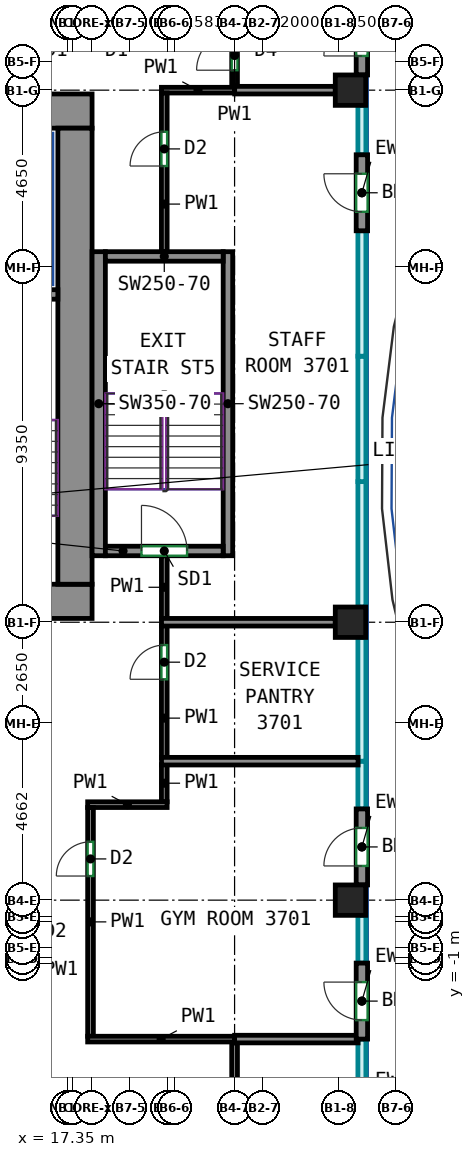
"""IFC4 building model, lengths in metres.
Left out: names, types, materials, properties, quantities, classifications, styles, units other than length and angle.
Written with IfcOpenShell. Run it as: python <this file> out.ifc"""

import sys

from ifc_helpers import new_model, si_unit, direction, frame, frame_2d, origin, origin_2d, place, context, subcontext, project, spatial, rectangle, extrude, source, transform, mapped, element, fill, save


model = new_model("IFC4")
c1 = context("Model", 3, precision=1e-05, world=origin(), true_north=direction((0.0, 1.0)))
c2 = subcontext(c1, "Body", "Model", "MODEL_VIEW")
j1 = project(units=[si_unit("LENGTHUNIT", "METRE"), si_unit("PLANEANGLEUNIT", "RADIAN")], contexts=[c1])
p1 = place(None, origin())
s1 = spatial("IfcSite", under=j1, at=p1, CompositionType="ELEMENT")
p2 = place(p1, origin())
s2 = spatial("IfcBuilding", under=s1, at=p2, CompositionType="ELEMENT")
p3 = place(p2, frame((0.0, 0.0, 160.9)))
s3 = spatial("IfcBuildingStorey", under=s2, at=p3, CompositionType="ELEMENT", Elevation=160.9)
m1 = source(origin(), c2, "Body", "SweptSolid", [
    extrude(rectangle(XDim=0.8, YDim=0.8, at=origin_2d()), origin(), (0.0, 0.0, 1.0), 3.0),
])
for number, where, z_axis, x_axis in (
    (1, (24.8, 0.688, 0.0), (0.0, 0.0, 1.0), (1.0, 0.0, 0.0)),
    (2, (24.8, 8.0, 0.0), (0.0, 0.0, 1.0), (1.0, 0.0, 0.0)),
    (3, (24.8, 22.0, 0.0), (0.0, 0.0, 1.0), (1.0, 0.0, 0.0)),
):
    element("IfcColumn", number, at=place(p3, frame(where, z_axis=z_axis, x_axis=x_axis)), inside=s3, PredefinedType="COLUMN", context=c2, shape_type="MappedRepresentation", body=[
        mapped(m1, transform((0.0, 0.0, 0.0))),
    ])
m2 = source(origin(), c2, "Body", "SweptSolid", [
    extrude(rectangle(XDim=5.53, YDim=0.9, at=frame_2d((2.765, 0.0))), origin(), (0.0, 0.0, 1.0), 3.0),
])
p4 = place(p3, frame((12.47, 8.55, 0.0), z_axis=(0.0, 0.0, 1.0), x_axis=(1.0, 0.0, 0.0)))
e4 = element("IfcWall", 4, at=p4, inside=s3, PredefinedType="SHEAR", context=c2, shape_type="MappedRepresentation", body=[
    mapped(m2, transform((0.0, 0.0, 0.0))),
])
p5 = place(p4, frame((2.18, 0.0, 0.0)))
e5 = element("IfcOpeningElement", 5, at=p5, cuts=e4, PredefinedType="OPENING", context=c2, shape_type="SweptSolid", body=[
    extrude(rectangle(XDim=1.2, YDim=2.1, at=frame_2d((0.6, 1.05))), frame((0.0, 0.46, 0.0), z_axis=(0.0, -1.0, 0.0), x_axis=(1.0, 0.0, 0.0)), (0.0, 0.0, 1.0), 0.92),
])
m3 = source(origin(), c2, "Body", "SweptSolid", [
    extrude(rectangle(XDim=33.9, YDim=0.9, at=frame_2d((16.95, 0.0))), origin(), (0.0, 0.0, 1.0), 3.0),
])
p6 = place(p3, frame((-15.9, 21.45, 0.0), z_axis=(0.0, 0.0, 1.0), x_axis=(1.0, 0.0, 0.0)))
e6 = element("IfcWall", 6, at=p6, inside=s3, PredefinedType="SHEAR", context=c2, shape_type="MappedRepresentation", body=[
    mapped(m3, transform((0.0, 0.0, 0.0))),
])
p7 = place(p6, frame((6.731, 0.0, 0.0)))
e7 = element("IfcOpeningElement", 7, at=p7, cuts=e6, PredefinedType="OPENING", context=c2, shape_type="SweptSolid", body=[
    extrude(rectangle(XDim=0.9, YDim=2.1, at=frame_2d((0.45, 1.05))), frame((0.0, 0.46, 0.0), z_axis=(0.0, -1.0, 0.0), x_axis=(1.0, 0.0, 0.0)), (0.0, 0.0, 1.0), 0.92),
])
p8 = place(p6, frame((12.038, 0.0, 0.0)))
e8 = element("IfcOpeningElement", 8, at=p8, cuts=e6, PredefinedType="OPENING", context=c2, shape_type="SweptSolid", body=[
    extrude(rectangle(XDim=0.9, YDim=2.1, at=frame_2d((0.45, 1.05))), frame((0.0, 0.46, 0.0), z_axis=(0.0, -1.0, 0.0), x_axis=(1.0, 0.0, 0.0)), (0.0, 0.0, 1.0), 0.92),
])
p9 = place(p6, frame((16.446, 0.0, 0.0)))
e9 = element("IfcOpeningElement", 9, at=p9, cuts=e6, PredefinedType="OPENING", context=c2, shape_type="SweptSolid", body=[
    extrude(rectangle(XDim=0.9, YDim=2.1, at=frame_2d((0.45, 1.05))), frame((0.0, 0.46, 0.0), z_axis=(0.0, -1.0, 0.0), x_axis=(1.0, 0.0, 0.0)), (0.0, 0.0, 1.0), 0.92),
])
p10 = place(p6, frame((18.858, 0.0, 0.0)))
e10 = element("IfcOpeningElement", 10, at=p10, cuts=e6, PredefinedType="OPENING", context=c2, shape_type="SweptSolid", body=[
    extrude(rectangle(XDim=0.9, YDim=2.1, at=frame_2d((0.45, 1.05))), frame((0.0, 0.46, 0.0), z_axis=(0.0, -1.0, 0.0), x_axis=(1.0, 0.0, 0.0)), (0.0, 0.0, 1.0), 0.92),
])
p11 = place(p6, frame((21.686, 0.0, 0.0)))
e11 = element("IfcOpeningElement", 11, at=p11, cuts=e6, PredefinedType="OPENING", context=c2, shape_type="SweptSolid", body=[
    extrude(rectangle(XDim=0.9, YDim=2.1, at=frame_2d((0.45, 1.05))), frame((0.0, 0.46, 0.0), z_axis=(0.0, -1.0, 0.0), x_axis=(1.0, 0.0, 0.0)), (0.0, 0.0, 1.0), 0.92),
])
p12 = place(p6, frame((26.027, 0.0, 0.0)))
e12 = element("IfcOpeningElement", 12, at=p12, cuts=e6, PredefinedType="OPENING", context=c2, shape_type="SweptSolid", body=[
    extrude(rectangle(XDim=0.9, YDim=2.1, at=frame_2d((0.45, 1.05))), frame((0.0, 0.46, 0.0), z_axis=(0.0, -1.0, 0.0), x_axis=(1.0, 0.0, 0.0)), (0.0, 0.0, 1.0), 0.92),
])
p13 = place(p6, frame((2.425, 0.0, 0.0)))
e13 = element("IfcOpeningElement", 13, at=p13, cuts=e6, PredefinedType="OPENING", context=c2, shape_type="SweptSolid", body=[
    extrude(rectangle(XDim=0.9, YDim=2.1, at=frame_2d((0.45, 1.05))), frame((0.0, 0.46, 0.0), z_axis=(0.0, -1.0, 0.0), x_axis=(1.0, 0.0, 0.0)), (0.0, 0.0, 1.0), 0.92),
])
p14 = place(p6, frame((30.575, 0.0, 0.0)))
e14 = element("IfcOpeningElement", 14, at=p14, cuts=e6, PredefinedType="OPENING", context=c2, shape_type="SweptSolid", body=[
    extrude(rectangle(XDim=0.9, YDim=2.1, at=frame_2d((0.45, 1.05))), frame((0.0, 0.46, 0.0), z_axis=(0.0, -1.0, 0.0), x_axis=(1.0, 0.0, 0.0)), (0.0, 0.0, 1.0), 0.92),
])
m4 = source(origin(), c2, "Body", "SweptSolid", [
    extrude(rectangle(XDim=12.0, YDim=0.9, at=frame_2d((6.0, 0.0))), origin(), (0.0, 0.0, 1.0), 3.0),
])
p15 = place(p3, frame((17.55, 9.0, 0.0), z_axis=(0.0, 0.0, 1.0), x_axis=(0.0, 1.0, 0.0)))
e15 = element("IfcWall", 15, at=p15, inside=s3, PredefinedType="SHEAR", context=c2, shape_type="MappedRepresentation", body=[
    mapped(m4, transform((0.0, 0.0, 0.0))),
])
m5 = source(origin(), c2, "Body", "SweptSolid", [
    extrude(rectangle(XDim=3.7, YDim=0.25, at=frame_2d((1.85, 0.0))), origin(), (0.0, 0.0, 1.0), 3.0),
])
p16 = place(p3, frame((13.4, 16.625, 0.0), z_axis=(0.0, 0.0, 1.0), x_axis=(1.0, 0.0, 0.0)))
e16 = element("IfcWall", 16, at=p16, inside=s3, PredefinedType="SHEAR", context=c2, shape_type="MappedRepresentation", body=[
    mapped(m5, transform((0.0, 0.0, 0.0))),
])
m6 = source(origin(), c2, "Body", "SweptSolid", [
    extrude(rectangle(XDim=8.0, YDim=0.35, at=frame_2d((4.0, 0.0))), origin(), (0.0, 0.0, 1.0), 3.0),
])
p17 = place(p3, frame((18.175, 9.75, 0.0), z_axis=(0.0, 0.0, 1.0), x_axis=(0.0, 1.0, 0.0)))
e17 = element("IfcWall", 17, at=p17, inside=s3, PredefinedType="SHEAR", context=c2, shape_type="MappedRepresentation", body=[
    mapped(m6, transform((0.0, 0.0, 0.0))),
])
m7 = source(origin(), c2, "Body", "SweptSolid", [
    extrude(rectangle(XDim=8.0, YDim=0.25, at=frame_2d((4.0, 0.0))), origin(), (0.0, 0.0, 1.0), 3.0),
])
p18 = place(p3, frame((21.575, 9.75, 0.0), z_axis=(0.0, 0.0, 1.0), x_axis=(0.0, 1.0, 0.0)))
e18 = element("IfcWall", 18, at=p18, inside=s3, PredefinedType="SHEAR", context=c2, shape_type="MappedRepresentation", body=[
    mapped(m7, transform((0.0, 0.0, 0.0))),
])
m8 = source(origin(), c2, "Body", "SweptSolid", [
    extrude(rectangle(XDim=3.1, YDim=0.25, at=frame_2d((1.55, 0.0))), origin(), (0.0, 0.0, 1.0), 3.0),
])
p19 = place(p3, frame((18.35, 9.875, 0.0), z_axis=(0.0, 0.0, 1.0), x_axis=(1.0, 0.0, 0.0)))
e19 = element("IfcWall", 19, at=p19, inside=s3, PredefinedType="SHEAR", context=c2, shape_type="MappedRepresentation", body=[
    mapped(m8, transform((0.0, 0.0, 0.0))),
])
p20 = place(p19, frame((0.95, 0.0, 0.0)))
e20 = element("IfcOpeningElement", 20, at=p20, cuts=e19, PredefinedType="OPENING", context=c2, shape_type="SweptSolid", body=[
    extrude(rectangle(XDim=1.2, YDim=2.1, at=frame_2d((0.6, 1.05))), frame((0.0, 0.135, 0.0), z_axis=(0.0, -1.0, 0.0), x_axis=(1.0, 0.0, 0.0)), (0.0, 0.0, 1.0), 0.27),
])
p21 = place(p3, frame((18.35, 17.625, 0.0), z_axis=(0.0, 0.0, 1.0), x_axis=(1.0, 0.0, 0.0)))
e21 = element("IfcWall", 21, at=p21, inside=s3, PredefinedType="SHEAR", context=c2, shape_type="MappedRepresentation", body=[
    mapped(m8, transform((0.0, 0.0, 0.0))),
])
m9 = source(origin(), c2, "Body", "SweptSolid", [
    extrude(rectangle(XDim=2.0, YDim=0.3, at=frame_2d((1.0, 0.0))), origin(), (0.0, 0.0, 1.0), 3.0),
])
p22 = place(p3, frame((25.1, -2.969, 0.0), z_axis=(0.0, 0.0, 1.0), x_axis=(0.0, 1.0, 0.0)))
e22 = element("IfcWall", 22, at=p22, inside=s3, PredefinedType="SOLIDWALL", context=c2, shape_type="MappedRepresentation", body=[
    mapped(m9, transform((0.0, 0.0, 0.0))),
])
p23 = place(p22, frame((0.5, 0.0, 0.0)))
e23 = element("IfcOpeningElement", 23, at=p23, cuts=e22, PredefinedType="OPENING", context=c2, shape_type="SweptSolid", body=[
    extrude(rectangle(XDim=1.0, YDim=2.1, at=frame_2d((0.5, 1.05))), frame((0.0, 0.16, 0.0), z_axis=(0.0, -1.0, 0.0), x_axis=(1.0, 0.0, 0.0)), (0.0, 0.0, 1.0), 0.32),
])
p24 = place(p3, frame((25.1, 1.087, 0.0), z_axis=(0.0, 0.0, 1.0), x_axis=(0.0, 1.0, 0.0)))
e24 = element("IfcWall", 24, at=p24, inside=s3, PredefinedType="SOLIDWALL", context=c2, shape_type="MappedRepresentation", body=[
    mapped(m9, transform((0.0, 0.0, 0.0))),
])
p25 = place(p24, frame((0.5, 0.0, 0.0)))
e25 = element("IfcOpeningElement", 25, at=p25, cuts=e24, PredefinedType="OPENING", context=c2, shape_type="SweptSolid", body=[
    extrude(rectangle(XDim=1.0, YDim=2.1, at=frame_2d((0.5, 1.05))), frame((0.0, 0.16, 0.0), z_axis=(0.0, -1.0, 0.0), x_axis=(1.0, 0.0, 0.0)), (0.0, 0.0, 1.0), 0.32),
])
p26 = place(p3, frame((25.1, 18.3, 0.0), z_axis=(0.0, 0.0, 1.0), x_axis=(0.0, 1.0, 0.0)))
e26 = element("IfcWall", 26, at=p26, inside=s3, PredefinedType="SOLIDWALL", context=c2, shape_type="MappedRepresentation", body=[
    mapped(m9, transform((0.0, 0.0, 0.0))),
])
p27 = place(p26, frame((0.5, 0.0, 0.0)))
e27 = element("IfcOpeningElement", 27, at=p27, cuts=e26, PredefinedType="OPENING", context=c2, shape_type="SweptSolid", body=[
    extrude(rectangle(XDim=1.0, YDim=2.1, at=frame_2d((0.5, 1.05))), frame((0.0, 0.16, 0.0), z_axis=(0.0, -1.0, 0.0), x_axis=(1.0, 0.0, 0.0)), (0.0, 0.0, 1.0), 0.32),
])
p28 = place(p3, frame((25.1, 22.4, 0.0), z_axis=(0.0, 0.0, 1.0), x_axis=(0.0, 1.0, 0.0)))
e28 = element("IfcWall", 28, at=p28, inside=s3, PredefinedType="SOLIDWALL", context=c2, shape_type="MappedRepresentation", body=[
    mapped(m9, transform((0.0, 0.0, 0.0))),
])
p29 = place(p28, frame((0.5, 0.0, 0.0)))
e29 = element("IfcOpeningElement", 29, at=p29, cuts=e28, PredefinedType="OPENING", context=c2, shape_type="SweptSolid", body=[
    extrude(rectangle(XDim=1.0, YDim=2.1, at=frame_2d((0.5, 1.05))), frame((0.0, 0.16, 0.0), z_axis=(0.0, -1.0, 0.0), x_axis=(1.0, 0.0, 0.0)), (0.0, 0.0, 1.0), 0.32),
])
p30 = place(p3, frame((21.75, 22.1, 0.0), z_axis=(0.0, 0.0, 1.0), x_axis=(0.0, 1.0, 0.0)))
e30 = element("IfcWall", 30, at=p30, inside=s3, PredefinedType="PARTITIONING", context=c2, shape_type="SweptSolid", body=[
    extrude(rectangle(XDim=1.625, YDim=0.15, at=frame_2d((0.812, 0.0))), origin(), (0.0, 0.0, 1.0), 3.0),
])
p31 = place(p30, frame((0.425, 0.0, 0.0)))
e31 = element("IfcOpeningElement", 31, at=p31, cuts=e30, PredefinedType="OPENING", context=c2, shape_type="SweptSolid", body=[
    extrude(rectangle(XDim=1.0, YDim=2.1, at=frame_2d((0.5, 1.05))), frame((0.0, 0.085, 0.0), z_axis=(0.0, -1.0, 0.0), x_axis=(1.0, 0.0, 0.0)), (0.0, 0.0, 1.0), 0.17),
])
p32 = place(p3, frame((19.9, 4.434, 0.0), z_axis=(0.0, 0.0, 1.0), x_axis=(0.0, 1.0, 0.0)))
e32 = element("IfcWall", 32, at=p32, inside=s3, PredefinedType="PARTITIONING", context=c2, shape_type="SweptSolid", body=[
    extrude(rectangle(XDim=3.476, YDim=0.15, at=frame_2d((1.738, 0.0))), origin(), (0.0, 0.0, 1.0), 3.0),
])
p33 = place(p32, frame((2.065, 0.0, 0.0)))
e33 = element("IfcOpeningElement", 33, at=p33, cuts=e32, PredefinedType="OPENING", context=c2, shape_type="SweptSolid", body=[
    extrude(rectangle(XDim=0.9, YDim=2.1, at=frame_2d((0.45, 1.05))), frame((0.0, 0.085, 0.0), z_axis=(0.0, -1.0, 0.0), x_axis=(1.0, 0.0, 0.0)), (0.0, 0.0, 1.0), 0.17),
])
p34 = place(p3, frame((19.825, 22.0, 0.0), z_axis=(0.0, 0.0, 1.0), x_axis=(1.0, 0.0, 0.0)))
e34 = element("IfcWall", 34, at=p34, inside=s3, PredefinedType="PARTITIONING", context=c2, shape_type="SweptSolid", body=[
    extrude(rectangle(XDim=1.925, YDim=0.15, at=frame_2d((0.962, 0.0))), origin(), (0.0, 0.0, 1.0), 3.0),
])
p35 = place(p3, frame((19.9, 17.75, 0.0), z_axis=(0.0, 0.0, 1.0), x_axis=(0.0, 1.0, 0.0)))
e35 = element("IfcWall", 35, at=p35, inside=s3, PredefinedType="PARTITIONING", context=c2, shape_type="SweptSolid", body=[
    extrude(rectangle(XDim=4.175, YDim=0.15, at=frame_2d((2.087, 0.0))), origin(), (0.0, 0.0, 1.0), 3.0),
])
p36 = place(p35, frame((2.254, 0.0, 0.0)))
e36 = element("IfcOpeningElement", 36, at=p36, cuts=e35, PredefinedType="OPENING", context=c2, shape_type="SweptSolid", body=[
    extrude(rectangle(XDim=0.9, YDim=2.1, at=frame_2d((0.45, 1.05))), frame((0.0, 0.085, 0.0), z_axis=(0.0, -1.0, 0.0), x_axis=(1.0, 0.0, 0.0)), (0.0, 0.0, 1.0), 0.17),
])
p37 = place(p3, frame((19.9, 8.09, 0.0), z_axis=(0.0, 0.0, 1.0), x_axis=(0.0, 1.0, 0.0)))
e37 = element("IfcWall", 37, at=p37, inside=s3, PredefinedType="PARTITIONING", context=c2, shape_type="SweptSolid", body=[
    extrude(rectangle(XDim=1.66, YDim=0.15, at=frame_2d((0.83, 0.0))), origin(), (0.0, 0.0, 1.0), 3.0),
])
p38 = place(p3, frame((19.9, 3.275, 0.0), z_axis=(0.0, 0.0, 1.0), x_axis=(0.0, 1.0, 0.0)))
e38 = element("IfcWall", 38, at=p38, inside=s3, PredefinedType="PARTITIONING", context=c2, shape_type="SweptSolid", body=[
    extrude(rectangle(XDim=0.979, YDim=0.15, at=frame_2d((0.49, 0.0))), origin(), (0.0, 0.0, 1.0), 3.0),
])
p39 = place(p3, frame((17.884, 3.2, 0.0), z_axis=(0.0, 0.0, 1.0), x_axis=(1.0, 0.0, 0.0)))
e39 = element("IfcWall", 39, at=p39, inside=s3, PredefinedType="PARTITIONING", context=c2, shape_type="SweptSolid", body=[
    extrude(rectangle(XDim=2.091, YDim=0.15, at=frame_2d((1.045, 0.0))), origin(), (0.0, 0.0, 1.0), 3.0),
])
p40 = place(p3, frame((17.959, -2.894, 0.0), z_axis=(0.0, 0.0, 1.0), x_axis=(0.0, 1.0, 0.0)))
e40 = element("IfcWall", 40, at=p40, inside=s3, PredefinedType="PARTITIONING", context=c2, shape_type="SweptSolid", body=[
    extrude(rectangle(XDim=6.019, YDim=0.15, at=frame_2d((3.01, 0.0))), origin(), (0.0, 0.0, 1.0), 3.0),
])
p41 = place(p40, frame((4.216, 0.0, 0.0)))
e41 = element("IfcOpeningElement", 41, at=p41, cuts=e40, PredefinedType="OPENING", context=c2, shape_type="SweptSolid", body=[
    extrude(rectangle(XDim=0.9, YDim=2.1, at=frame_2d((0.45, 1.05))), frame((0.0, 0.085, 0.0), z_axis=(0.0, -1.0, 0.0), x_axis=(1.0, 0.0, 0.0)), (0.0, 0.0, 1.0), 0.17),
])
p42 = place(p3, frame((21.751, -2.969, 0.0), z_axis=(0.0, 0.0, 1.0), x_axis=(-1.0, 0.0, 0.0)))
e42 = element("IfcWall", 42, at=p42, inside=s3, PredefinedType="PARTITIONING", context=c2, shape_type="SweptSolid", body=[
    extrude(rectangle(XDim=3.867, YDim=0.15, at=frame_2d((1.934, 0.0))), origin(), (0.0, 0.0, 1.0), 3.0),
])
p43 = place(p3, frame((21.75, -7.75, 0.0), z_axis=(0.0, 0.0, 1.0), x_axis=(0.0, 1.0, 0.0)))
e43 = element("IfcWall", 43, at=p43, inside=s3, PredefinedType="PARTITIONING", context=c2, shape_type="SweptSolid", body=[
    extrude(rectangle(XDim=4.682, YDim=0.15, at=frame_2d((2.341, 0.0))), origin(), (0.0, 0.0, 1.0), 3.0),
])
p44 = place(p43, frame((2.704, 0.0, 0.0)))
e44 = element("IfcOpeningElement", 44, at=p44, cuts=e43, PredefinedType="OPENING", context=c2, shape_type="SweptSolid", body=[
    extrude(rectangle(XDim=0.9, YDim=2.1, at=frame_2d((0.45, 1.05))), frame((0.0, 0.085, 0.0), z_axis=(0.0, -1.0, 0.0), x_axis=(1.0, 0.0, 0.0)), (0.0, 0.0, 1.0), 0.17),
])
p45 = place(p3, frame((21.752, 22.0, 0.0), z_axis=(0.0, 0.0, 1.0), x_axis=(1.0, 0.0, 0.0)))
e45 = element("IfcWall", 45, at=p45, inside=s3, PredefinedType="PARTITIONING", context=c2, shape_type="SweptSolid", body=[
    extrude(rectangle(XDim=2.648, YDim=0.2, at=frame_2d((1.324, 0.0))), origin(), (0.0, 0.0, 1.0), 3.0),
])
p46 = place(p3, frame((19.827, 8.0, 0.0), z_axis=(0.0, 0.0, 1.0), x_axis=(1.0, 0.0, 0.0)))
e46 = element("IfcWall", 46, at=p46, inside=s3, PredefinedType="PARTITIONING", context=c2, shape_type="SweptSolid", body=[
    extrude(rectangle(XDim=4.573, YDim=0.2, at=frame_2d((2.287, 0.0))), origin(), (0.0, 0.0, 1.0), 3.0),
])
p47 = place(p3, frame((19.827, 4.344, 0.0), z_axis=(0.0, 0.0, 1.0), x_axis=(1.0, 0.0, 0.0)))
e47 = element("IfcWall", 47, at=p47, inside=s3, PredefinedType="PARTITIONING", context=c2, shape_type="SweptSolid", body=[
    extrude(rectangle(XDim=5.173, YDim=0.2, at=frame_2d((2.586, 0.0))), origin(), (0.0, 0.0, 1.0), 3.0),
])
p48 = place(p3, frame((21.751, -2.968, 0.0), z_axis=(0.0, 0.0, 1.0), x_axis=(0.999999954829, -0.000300571071, 0.0)))
e48 = element("IfcWall", 48, at=p48, inside=s3, PredefinedType="PARTITIONING", context=c2, shape_type="SweptSolid", body=[
    extrude(rectangle(XDim=3.249, YDim=0.2, at=frame_2d((1.625, 0.0))), origin(), (0.0, 0.0, 1.0), 3.0),
])
p49 = place(p23, origin())
e49 = element("IfcDoor", 49, at=p49, inside=s3, OperationType="SINGLE_SWING_RIGHT", PredefinedType="DOOR", context=c2, shape_type="SweptSolid", body=[
    extrude(rectangle(XDim=1.0, YDim=2.1, at=frame_2d((0.5, 1.05))), frame((0.0, 0.025, 0.0), z_axis=(0.0, -1.0, 0.0), x_axis=(1.0, 0.0, 0.0)), (0.0, 0.0, 1.0), 0.05),
])
fill(e23, e49)
p50 = place(p25, origin())
e50 = element("IfcDoor", 50, at=p50, inside=s3, OperationType="SINGLE_SWING_LEFT", PredefinedType="DOOR", context=c2, shape_type="SweptSolid", body=[
    extrude(rectangle(XDim=1.0, YDim=2.1, at=frame_2d((0.5, 1.05))), frame((0.0, 0.025, 0.0), z_axis=(0.0, -1.0, 0.0), x_axis=(1.0, 0.0, 0.0)), (0.0, 0.0, 1.0), 0.05),
])
fill(e25, e50)
p51 = place(p27, origin())
e51 = element("IfcDoor", 51, at=p51, inside=s3, OperationType="SINGLE_SWING_RIGHT", PredefinedType="DOOR", context=c2, shape_type="SweptSolid", body=[
    extrude(rectangle(XDim=1.0, YDim=2.1, at=frame_2d((0.5, 1.05))), frame((0.0, 0.025, 0.0), z_axis=(0.0, -1.0, 0.0), x_axis=(1.0, 0.0, 0.0)), (0.0, 0.0, 1.0), 0.05),
])
fill(e27, e51)
p52 = place(p29, origin())
e52 = element("IfcDoor", 52, at=p52, inside=s3, OperationType="SINGLE_SWING_LEFT", PredefinedType="DOOR", context=c2, shape_type="SweptSolid", body=[
    extrude(rectangle(XDim=1.0, YDim=2.1, at=frame_2d((0.5, 1.05))), frame((0.0, 0.025, 0.0), z_axis=(0.0, -1.0, 0.0), x_axis=(1.0, 0.0, 0.0)), (0.0, 0.0, 1.0), 0.05),
])
fill(e29, e52)
p53 = place(p20, origin())
e53 = element("IfcDoor", 53, at=p53, inside=s3, OperationType="DOUBLE_DOOR_SINGLE_SWING", PredefinedType="DOOR", context=c2, shape_type="SweptSolid", body=[
    extrude(rectangle(XDim=1.2, YDim=2.1, at=frame_2d((0.6, 1.05))), frame((0.0, 0.025, 0.0), z_axis=(0.0, -1.0, 0.0), x_axis=(1.0, 0.0, 0.0)), (0.0, 0.0, 1.0), 0.05),
])
fill(e20, e53)
p54 = place(p41, origin())
e54 = element("IfcDoor", 54, at=p54, inside=s3, OperationType="SINGLE_SWING_LEFT", PredefinedType="DOOR", context=c2, shape_type="SweptSolid", body=[
    extrude(rectangle(XDim=0.9, YDim=2.1, at=frame_2d((0.45, 1.05))), frame((0.0, 0.025, 0.0), z_axis=(0.0, -1.0, 0.0), x_axis=(1.0, 0.0, 0.0)), (0.0, 0.0, 1.0), 0.05),
])
fill(e41, e54)
p55 = place(p33, origin())
e55 = element("IfcDoor", 55, at=p55, inside=s3, OperationType="SINGLE_SWING_LEFT", PredefinedType="DOOR", context=c2, shape_type="SweptSolid", body=[
    extrude(rectangle(XDim=0.9, YDim=2.1, at=frame_2d((0.45, 1.05))), frame((0.0, 0.025, 0.0), z_axis=(0.0, -1.0, 0.0), x_axis=(1.0, 0.0, 0.0)), (0.0, 0.0, 1.0), 0.05),
])
fill(e33, e55)
p56 = place(p36, origin())
e56 = element("IfcDoor", 56, at=p56, inside=s3, OperationType="SINGLE_SWING_LEFT", PredefinedType="DOOR", context=c2, shape_type="SweptSolid", body=[
    extrude(rectangle(XDim=0.9, YDim=2.1, at=frame_2d((0.45, 1.05))), frame((0.0, 0.025, 0.0), z_axis=(0.0, -1.0, 0.0), x_axis=(1.0, 0.0, 0.0)), (0.0, 0.0, 1.0), 0.05),
])
fill(e36, e56)
p57 = place(p31, origin())
e57 = element("IfcDoor", 57, at=p57, inside=s3, OperationType="SINGLE_SWING_LEFT", PredefinedType="DOOR", context=c2, shape_type="SweptSolid", body=[
    extrude(rectangle(XDim=1.0, YDim=2.1, at=frame_2d((0.5, 1.05))), frame((0.0, 0.025, 0.0), z_axis=(0.0, -1.0, 0.0), x_axis=(1.0, 0.0, 0.0)), (0.0, 0.0, 1.0), 0.05),
])
fill(e31, e57)
save(model, sys.argv[1])
